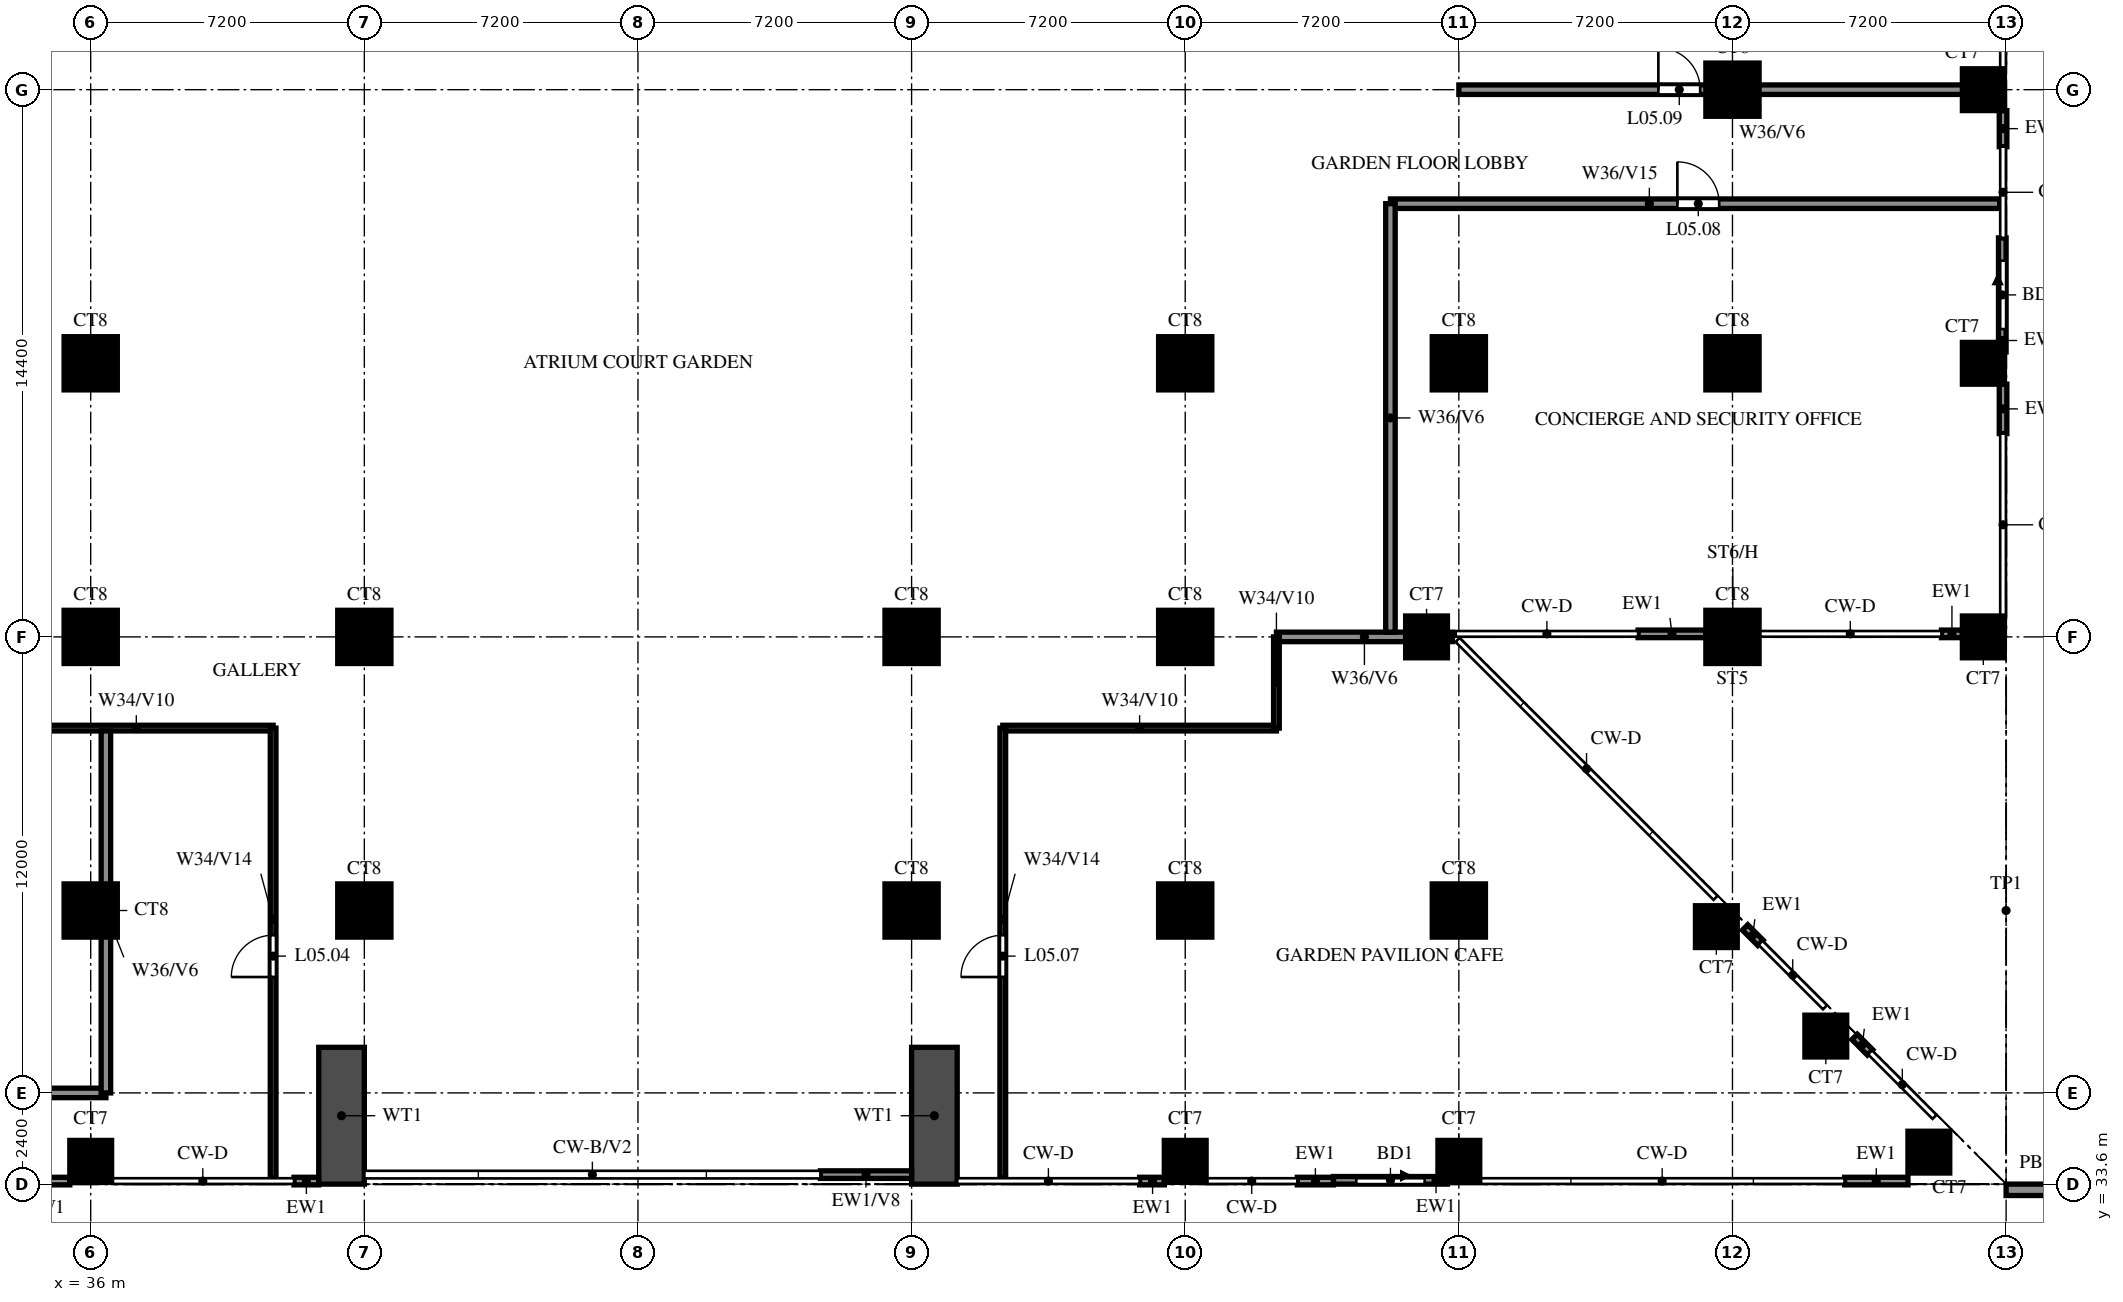
"""IFC4 building model, lengths in metres.
Left out: names, types, materials, properties, quantities, classifications, styles, units other than length and angle.
Written with IfcOpenShell. Run it as: python <this file> out.ifc"""

import sys

from ifc_helpers import new_model, si_unit, direction, frame, frame_2d, origin, origin_2d, place, context, subcontext, project, spatial, rectangle, extrude, source, transform, mapped, element, fill, save


model = new_model("IFC4")
c1 = context("Model", 3, precision=1e-05, world=origin(), true_north=direction((0.0, 1.0)))
c2 = subcontext(c1, "Body", "Model", "MODEL_VIEW")
j1 = project(units=[si_unit("LENGTHUNIT", "METRE"), si_unit("PLANEANGLEUNIT", "RADIAN")], contexts=[c1])
p1 = place(None, origin())
s1 = spatial("IfcSite", under=j1, at=p1, CompositionType="ELEMENT")
p2 = place(p1, origin())
s2 = spatial("IfcBuilding", under=s1, at=p2, CompositionType="ELEMENT")
p3 = place(p2, frame((0.0, 0.0, 27.0)))
s3 = spatial("IfcBuildingStorey", under=s2, at=p3, CompositionType="ELEMENT", Elevation=27.0)
m1 = source(origin(), c2, "Body", "SweptSolid", [
    extrude(rectangle(XDim=1.1, YDim=1.1, at=origin_2d()), origin(), (0.0, 0.0, 1.0), 3.18),
])
for number, where, z_axis, x_axis in (
    (1, (36.0, 34.2, 0.0), (0.0, 0.0, 1.0), (1.0, 0.0, 0.0)),
    (2, (64.8, 34.2, 0.0), (0.0, 0.0, 1.0), (1.0, 0.0, 0.0)),
    (3, (72.0, 34.2, 0.0), (0.0, 0.0, 1.0), (1.0, 0.0, 0.0)),
    (4, (84.367, 34.442, 0.0), (0.0, 0.0, 1.0), (1.0, 0.0, 0.0)),
    (5, (81.656, 37.496, 0.0), (0.0, 0.0, 1.0), (1.0, 0.0, 0.0)),
    (6, (78.776, 40.376, 0.0), (0.0, 0.0, 1.0), (1.0, 0.0, 0.0)),
):
    element("IfcColumn", number, at=place(p3, frame(where, z_axis=z_axis, x_axis=x_axis)), inside=s3, PredefinedType="COLUMN", context=c2, shape_type="MappedRepresentation", body=[
        mapped(m1, transform((0.0, 0.0, 0.0))),
    ])
m2 = source(origin(), c2, "Body", "SweptSolid", [
    extrude(rectangle(XDim=1.4, YDim=1.4, at=origin_2d()), origin(), (0.0, 0.0, 1.0), 3.18),
])
for number, where, z_axis, x_axis in (
    (7, (36.0, 40.8, 0.0), (0.0, 0.0, 1.0), (1.0, 0.0, 0.0)),
    (8, (43.2, 40.8, 0.0), (0.0, 0.0, 1.0), (1.0, 0.0, 0.0)),
    (9, (57.6, 40.8, 0.0), (0.0, 0.0, 1.0), (1.0, 0.0, 0.0)),
    (10, (64.8, 40.8, 0.0), (0.0, 0.0, 1.0), (1.0, 0.0, 0.0)),
    (11, (72.0, 40.8, 0.0), (0.0, 0.0, 1.0), (1.0, 0.0, 0.0)),
    (12, (36.0, 48.0, 0.0), (0.0, 0.0, 1.0), (1.0, 0.0, 0.0)),
    (13, (43.2, 48.0, 0.0), (0.0, 0.0, 1.0), (1.0, 0.0, 0.0)),
    (14, (57.6, 48.0, 0.0), (0.0, 0.0, 1.0), (1.0, 0.0, 0.0)),
    (15, (64.8, 48.0, 0.0), (0.0, 0.0, 1.0), (1.0, 0.0, 0.0)),
):
    element("IfcColumn", number, at=place(p3, frame(where, z_axis=z_axis, x_axis=x_axis)), inside=s3, PredefinedType="COLUMN", context=c2, shape_type="MappedRepresentation", body=[
        mapped(m2, transform((0.0, 0.0, 0.0))),
    ])
p4 = place(p3, frame((71.15, 48.0, 0.0), z_axis=(0.0, 0.0, 1.0), x_axis=(1.0, 0.0, 0.0)))
e16 = element("IfcColumn", 16, at=p4, inside=s3, PredefinedType="COLUMN", context=c2, shape_type="MappedRepresentation", body=[
    mapped(m1, transform((0.0, 0.0, 0.0))),
])
p5 = place(p3, frame((79.2, 48.0, 0.0), z_axis=(0.0, 0.0, 1.0), x_axis=(1.0, 0.0, 0.0)))
e17 = element("IfcColumn", 17, at=p5, inside=s3, PredefinedType="COLUMN", context=c2, shape_type="MappedRepresentation", body=[
    mapped(m2, transform((0.0, 0.0, 0.0))),
])
p6 = place(p3, frame((85.8, 48.0, 0.0), z_axis=(0.0, 0.0, 1.0), x_axis=(1.0, 0.0, 0.0)))
e18 = element("IfcColumn", 18, at=p6, inside=s3, PredefinedType="COLUMN", context=c2, shape_type="MappedRepresentation", body=[
    mapped(m1, transform((0.0, 0.0, 0.0))),
])
for number, where, z_axis, x_axis in (
    (19, (36.0, 55.2, 0.0), (0.0, 0.0, 1.0), (1.0, 0.0, 0.0)),
    (20, (64.8, 55.2, 0.0), (0.0, 0.0, 1.0), (1.0, 0.0, 0.0)),
    (21, (72.0, 55.2, 0.0), (0.0, 0.0, 1.0), (1.0, 0.0, 0.0)),
    (22, (79.2, 55.2, 0.0), (0.0, 0.0, 1.0), (1.0, 0.0, 0.0)),
):
    element("IfcColumn", number, at=place(p3, frame(where, z_axis=z_axis, x_axis=x_axis)), inside=s3, PredefinedType="COLUMN", context=c2, shape_type="MappedRepresentation", body=[
        mapped(m2, transform((0.0, 0.0, 0.0))),
    ])
p7 = place(p3, frame((85.8, 55.2, 0.0), z_axis=(0.0, 0.0, 1.0), x_axis=(1.0, 0.0, 0.0)))
e23 = element("IfcColumn", 23, at=p7, inside=s3, PredefinedType="COLUMN", context=c2, shape_type="MappedRepresentation", body=[
    mapped(m1, transform((0.0, 0.0, 0.0))),
])
p8 = place(p3, frame((79.2, 62.4, 0.0), z_axis=(0.0, 0.0, 1.0), x_axis=(1.0, 0.0, 0.0)))
e24 = element("IfcColumn", 24, at=p8, inside=s3, PredefinedType="COLUMN", context=c2, shape_type="MappedRepresentation", body=[
    mapped(m2, transform((0.0, 0.0, 0.0))),
])
p9 = place(p3, frame((85.8, 62.4, 0.0), z_axis=(0.0, 0.0, 1.0), x_axis=(1.0, 0.0, 0.0)))
e25 = element("IfcColumn", 25, at=p9, inside=s3, PredefinedType="COLUMN", context=c2, shape_type="MappedRepresentation", body=[
    mapped(m1, transform((0.0, 0.0, 0.0))),
])
for number, where, z_axis, x_axis in (
    (26, (42.6, 33.6, 0.0), (0.0, 0.0, 1.0), (0.0, 1.0, 0.0)),
    (27, (58.2, 33.6, 0.0), (0.0, 0.0, 1.0), (0.0, 1.0, 0.0)),
):
    element("IfcWall", number, at=place(p3, frame(where, z_axis=z_axis, x_axis=x_axis)), inside=s3, PredefinedType="SHEAR", context=c2, shape_type="SweptSolid", body=[
        extrude(rectangle(XDim=3.6, YDim=1.2, at=frame_2d((1.8, 0.0))), origin(), (0.0, 0.0, 1.0), 3.18),
    ])
p10 = place(p3, frame((82.82, 37.067, 0.0), z_axis=(0.0, 0.0, 1.0), x_axis=(-0.707106781187, 0.707106781187, 0.0)))
e28 = element("IfcWall", 28, at=p10, inside=s3, PredefinedType="SOLIDWALL", context=c2, shape_type="SweptSolid", body=[
    extrude(rectangle(XDim=0.577, YDim=0.2, at=frame_2d((0.289, 0.0))), origin(), (0.0, 0.0, 1.0), 3.18),
])
p11 = place(p3, frame((79.938, 39.949, 0.0), z_axis=(0.0, 0.0, 1.0), x_axis=(-0.707106781187, 0.707106781187, 0.0)))
e29 = element("IfcWall", 29, at=p11, inside=s3, PredefinedType="SOLIDWALL", context=c2, shape_type="SweptSolid", body=[
    extrude(rectangle(XDim=0.573, YDim=0.2, at=frame_2d((0.286, 0.0))), origin(), (0.0, 0.0, 1.0), 3.18),
])
p12 = place(p3, frame((76.717, 48.08, 0.0), z_axis=(0.0, 0.0, 1.0), x_axis=(1.0, 0.0, 0.0)))
e30 = element("IfcWall", 30, at=p12, inside=s3, PredefinedType="SOLIDWALL", context=c2, shape_type="SweptSolid", body=[
    extrude(rectangle(XDim=1.783, YDim=0.2, at=frame_2d((0.892, 0.0))), origin(), (0.0, 0.0, 1.0), 3.18),
])
p13 = place(p3, frame((84.7, 48.08, 0.0), z_axis=(0.0, 0.0, 1.0), x_axis=(1.0, 0.0, 0.0)))
e31 = element("IfcWall", 31, at=p13, inside=s3, PredefinedType="SOLIDWALL", context=c2, shape_type="SweptSolid", body=[
    extrude(rectangle(XDim=0.55, YDim=0.2, at=frame_2d((0.275, 0.0))), origin(), (0.0, 0.0, 1.0), 3.18),
])
p14 = place(p3, frame((86.3, 55.5, 0.0), z_axis=(0.0, 0.0, 1.0), x_axis=(0.0, 1.0, 0.0)))
e32 = element("IfcWall", 32, at=p14, inside=s3, PredefinedType="SOLIDWALL", context=c2, shape_type="SweptSolid", body=[
    extrude(rectangle(XDim=3.0, YDim=0.2, at=frame_2d((1.5, 0.0))), origin(), (0.0, 0.0, 1.0), 3.18),
])
p15 = place(p14, frame((0.6, 0.0, 0.0)))
e33 = element("IfcOpeningElement", 33, at=p15, cuts=e32, PredefinedType="OPENING", context=c2, shape_type="SweptSolid", body=[
    extrude(rectangle(XDim=1.8, YDim=2.4, at=frame_2d((0.9, 1.2))), frame((0.0, 0.11, 0.0), z_axis=(0.0, -1.0, 0.0), x_axis=(1.0, 0.0, 0.0)), (0.0, 0.0, 1.0), 0.22),
])
p16 = place(p3, frame((86.32, 53.35, 0.0), z_axis=(0.0, 0.0, 1.0), x_axis=(0.0, 1.0, 0.0)))
e34 = element("IfcWall", 34, at=p16, inside=s3, PredefinedType="SOLIDWALL", context=c2, shape_type="SweptSolid", body=[
    extrude(rectangle(XDim=1.3, YDim=0.2, at=frame_2d((0.65, 0.0))), origin(), (0.0, 0.0, 1.0), 3.18),
])
p17 = place(p3, frame((86.32, 60.9, 0.0), z_axis=(0.0, 0.0, 1.0), x_axis=(0.0, 1.0, 0.0)))
e35 = element("IfcWall", 35, at=p17, inside=s3, PredefinedType="SOLIDWALL", context=c2, shape_type="SweptSolid", body=[
    extrude(rectangle(XDim=0.95, YDim=0.2, at=frame_2d((0.475, 0.0))), origin(), (0.0, 0.0, 1.0), 3.18),
])
p18 = place(p3, frame((68.7, 33.7, 0.0), z_axis=(0.0, 0.0, 1.0), x_axis=(1.0, 0.0, 0.0)))
e36 = element("IfcWall", 36, at=p18, inside=s3, PredefinedType="SOLIDWALL", context=c2, shape_type="SweptSolid", body=[
    extrude(rectangle(XDim=3.0, YDim=0.2, at=frame_2d((1.5, 0.0))), origin(), (0.0, 0.0, 1.0), 3.18),
])
p19 = place(p18, frame((0.6, 0.0, 0.0)))
e37 = element("IfcOpeningElement", 37, at=p19, cuts=e36, PredefinedType="OPENING", context=c2, shape_type="SweptSolid", body=[
    extrude(rectangle(XDim=1.8, YDim=2.4, at=frame_2d((0.9, 1.2))), frame((0.0, 0.11, 0.0), z_axis=(0.0, -1.0, 0.0), x_axis=(1.0, 0.0, 0.0)), (0.0, 0.0, 1.0), 0.22),
])
p20 = place(p3, frame((34.15, 33.68, 0.0), z_axis=(0.0, 0.0, 1.0), x_axis=(1.0, 0.0, 0.0)))
e38 = element("IfcWall", 38, at=p20, inside=s3, PredefinedType="SOLIDWALL", context=c2, shape_type="SweptSolid", body=[
    extrude(rectangle(XDim=1.3, YDim=0.2, at=frame_2d((0.65, 0.0))), origin(), (0.0, 0.0, 1.0), 3.18),
])
for number, where, z_axis, x_axis in (
    (39, (41.35, 33.68, 0.0), (0.0, 0.0, 1.0), (1.0, 0.0, 0.0)),
    (40, (63.6, 33.68, 0.0), (0.0, 0.0, 1.0), (1.0, 0.0, 0.0)),
):
    element("IfcWall", number, at=place(p3, frame(where, z_axis=z_axis, x_axis=x_axis)), inside=s3, PredefinedType="SOLIDWALL", context=c2, shape_type="SweptSolid", body=[
        extrude(rectangle(XDim=0.65, YDim=0.2, at=frame_2d((0.325, 0.0))), origin(), (0.0, 0.0, 1.0), 3.18),
    ])
p21 = place(p3, frame((67.75, 33.68, 0.0), z_axis=(0.0, 0.0, 1.0), x_axis=(1.0, 0.0, 0.0)))
e41 = element("IfcWall", 41, at=p21, inside=s3, PredefinedType="SOLIDWALL", context=c2, shape_type="SweptSolid", body=[
    extrude(rectangle(XDim=0.95, YDim=0.2, at=frame_2d((0.475, 0.0))), origin(), (0.0, 0.0, 1.0), 3.18),
])
p22 = place(p3, frame((82.15, 33.68, 0.0), z_axis=(0.0, 0.0, 1.0), x_axis=(1.0, 0.0, 0.0)))
e42 = element("IfcWall", 42, at=p22, inside=s3, PredefinedType="SOLIDWALL", context=c2, shape_type="SweptSolid", body=[
    extrude(rectangle(XDim=1.667, YDim=0.2, at=frame_2d((0.834, 0.0))), origin(), (0.0, 0.0, 1.0), 3.18),
])
p23 = place(p3, frame((55.2, 33.85, 0.0), z_axis=(0.0, 0.0, 1.0), x_axis=(1.0, 0.0, 0.0)))
e43 = element("IfcWall", 43, at=p23, inside=s3, PredefinedType="SOLIDWALL", context=c2, shape_type="SweptSolid", body=[
    extrude(rectangle(XDim=2.4, YDim=0.2, at=frame_2d((1.2, 0.0))), origin(), (0.0, 0.0, 1.0), 1.98),
])
p24 = place(p3, frame((86.4, 33.45, -0.45), z_axis=(0.0, 0.0, 1.0), x_axis=(1.0, 0.0, 0.0)))
e44 = element("IfcWall", 44, at=p24, inside=s3, PredefinedType="SOLIDWALL", context=c2, shape_type="SweptSolid", body=[
    extrude(rectangle(XDim=2.4, YDim=0.3, at=frame_2d((1.2, 0.0))), origin(), (0.0, 0.0, 1.0), 3.63),
])
p25 = place(p3, frame((22.0, 36.0, 0.0), z_axis=(0.0, 0.0, 1.0), x_axis=(1.0, 0.0, 0.0)))
e45 = element("IfcWall", 45, at=p25, inside=s3, PredefinedType="SOLIDWALL", context=c2, shape_type="SweptSolid", body=[
    extrude(rectangle(XDim=14.4, YDim=0.25, at=frame_2d((7.2, 0.0))), origin(), (0.0, 0.0, 1.0), 3.18),
])
for number, where, z_axis, x_axis in (
    (46, (33.6, 45.6, 0.0), (0.0, 0.0, 1.0), (1.0, 0.0, 0.0)),
    (47, (60.0, 45.6, 0.0), (0.0, 0.0, 1.0), (1.0, 0.0, 0.0)),
):
    element("IfcWall", number, at=place(p3, frame(where, z_axis=z_axis, x_axis=x_axis)), inside=s3, PredefinedType="PARTITIONING", context=c2, shape_type="SweptSolid", body=[
        extrude(rectangle(XDim=7.2, YDim=0.15, at=frame_2d((3.6, 0.0))), origin(), (0.0, 0.0, 1.0), 3.18),
    ])
p26 = place(p3, frame((67.2, 48.0, 0.0), z_axis=(0.0, 0.0, 1.0), x_axis=(1.0, 0.0, 0.0)))
e48 = element("IfcWall", 48, at=p26, inside=s3, PredefinedType="SOLIDWALL", context=c2, shape_type="SweptSolid", body=[
    extrude(rectangle(XDim=4.63, YDim=0.25, at=frame_2d((2.315, 0.0))), origin(), (0.0, 0.0, 1.0), 3.18),
])
p27 = place(p3, frame((70.2, 59.4, 0.0), z_axis=(0.0, 0.0, 1.0), x_axis=(1.0, 0.0, 0.0)))
e49 = element("IfcWall", 49, at=p27, inside=s3, PredefinedType="SOLIDWALL", context=c2, shape_type="SweptSolid", body=[
    extrude(rectangle(XDim=16.03, YDim=0.25, at=frame_2d((8.015, 0.0))), origin(), (0.0, 0.0, 1.0), 2.28),
])
p28 = place(p27, frame((7.55, 0.0, 0.0)))
e50 = element("IfcOpeningElement", 50, at=p28, cuts=e49, PredefinedType="OPENING", context=c2, shape_type="SweptSolid", body=[
    extrude(rectangle(XDim=1.1, YDim=2.1, at=frame_2d((0.55, 1.05))), frame((0.0, 0.135, 0.0), z_axis=(0.0, -1.0, 0.0), x_axis=(1.0, 0.0, 0.0)), (0.0, 0.0, 1.0), 0.27),
])
p29 = place(p3, frame((72.0, 62.4, 0.0), z_axis=(0.0, 0.0, 1.0), x_axis=(1.0, 0.0, 0.0)))
e51 = element("IfcWall", 51, at=p29, inside=s3, PredefinedType="SOLIDWALL", context=c2, shape_type="SweptSolid", body=[
    extrude(rectangle(XDim=14.23, YDim=0.25, at=frame_2d((7.115, 0.0))), origin(), (0.0, 0.0, 1.0), 3.18),
])
p30 = place(p29, frame((5.25, 0.0, 0.0)))
e52 = element("IfcOpeningElement", 52, at=p30, cuts=e51, PredefinedType="OPENING", context=c2, shape_type="SweptSolid", body=[
    extrude(rectangle(XDim=1.1, YDim=2.1, at=frame_2d((0.55, 1.05))), frame((0.0, 0.135, 0.0), z_axis=(0.0, -1.0, 0.0), x_axis=(1.0, 0.0, 0.0)), (0.0, 0.0, 1.0), 0.27),
])
p31 = place(p3, frame((36.4, 36.0, 0.0), z_axis=(0.0, 0.0, 1.0), x_axis=(0.0, 1.0, 0.0)))
e53 = element("IfcWall", 53, at=p31, inside=s3, PredefinedType="SOLIDWALL", context=c2, shape_type="SweptSolid", body=[
    extrude(rectangle(XDim=9.525, YDim=0.25, at=frame_2d((4.762, 0.0))), origin(), (0.0, 0.0, 1.0), 3.18),
])
p32 = place(p3, frame((40.8, 33.77, 0.0), z_axis=(0.0, 0.0, 1.0), x_axis=(0.0, 1.0, 0.0)))
e54 = element("IfcWall", 54, at=p32, inside=s3, PredefinedType="PARTITIONING", context=c2, shape_type="SweptSolid", body=[
    extrude(rectangle(XDim=11.83, YDim=0.15, at=frame_2d((5.915, 0.0))), origin(), (0.0, 0.0, 1.0), 2.28),
])
p33 = place(p32, frame((5.28, 0.0, 0.0)))
e55 = element("IfcOpeningElement", 55, at=p33, cuts=e54, PredefinedType="OPENING", context=c2, shape_type="SweptSolid", body=[
    extrude(rectangle(XDim=1.1, YDim=2.1, at=frame_2d((0.55, 1.05))), frame((0.0, 0.085, 0.0), z_axis=(0.0, -1.0, 0.0), x_axis=(1.0, 0.0, 0.0)), (0.0, 0.0, 1.0), 0.17),
])
p34 = place(p3, frame((60.0, 33.77, 0.0), z_axis=(0.0, 0.0, 1.0), x_axis=(0.0, 1.0, 0.0)))
e56 = element("IfcWall", 56, at=p34, inside=s3, PredefinedType="PARTITIONING", context=c2, shape_type="SweptSolid", body=[
    extrude(rectangle(XDim=11.83, YDim=0.15, at=frame_2d((5.915, 0.0))), origin(), (0.0, 0.0, 1.0), 2.28),
])
p35 = place(p34, frame((5.28, 0.0, 0.0)))
e57 = element("IfcOpeningElement", 57, at=p35, cuts=e56, PredefinedType="OPENING", context=c2, shape_type="SweptSolid", body=[
    extrude(rectangle(XDim=1.1, YDim=2.1, at=frame_2d((0.55, 1.05))), frame((0.0, 0.085, 0.0), z_axis=(0.0, -1.0, 0.0), x_axis=(1.0, 0.0, 0.0)), (0.0, 0.0, 1.0), 0.17),
])
p36 = place(p3, frame((67.2, 45.6, 0.0), z_axis=(0.0, 0.0, 1.0), x_axis=(0.0, 1.0, 0.0)))
e58 = element("IfcWall", 58, at=p36, inside=s3, PredefinedType="PARTITIONING", context=c2, shape_type="SweptSolid", body=[
    extrude(rectangle(XDim=2.4, YDim=0.15, at=frame_2d((1.2, 0.0))), origin(), (0.0, 0.0, 1.0), 3.18),
])
p37 = place(p3, frame((70.2, 48.125, 0.0), z_axis=(0.0, 0.0, 1.0), x_axis=(0.0, 1.0, 0.0)))
e59 = element("IfcWall", 59, at=p37, inside=s3, PredefinedType="SOLIDWALL", context=c2, shape_type="SweptSolid", body=[
    extrude(rectangle(XDim=11.275, YDim=0.25, at=frame_2d((5.637, 0.0))), origin(), (0.0, 0.0, 1.0), 3.18),
])
p38 = place(p15, origin())
e60 = element("IfcDoor", 60, at=p38, inside=s3, OperationType="DOUBLE_DOOR_SLIDING", PredefinedType="DOOR", context=c2, shape_type="SweptSolid", body=[
    extrude(rectangle(XDim=1.8, YDim=2.4, at=frame_2d((0.9, 1.2))), frame((0.0, 0.025, 0.0), z_axis=(0.0, -1.0, 0.0), x_axis=(1.0, 0.0, 0.0)), (0.0, 0.0, 1.0), 0.05),
])
fill(e33, e60)
p39 = place(p19, origin())
e61 = element("IfcDoor", 61, at=p39, inside=s3, OperationType="DOUBLE_DOOR_SLIDING", PredefinedType="DOOR", context=c2, shape_type="SweptSolid", body=[
    extrude(rectangle(XDim=1.8, YDim=2.4, at=frame_2d((0.9, 1.2))), frame((0.0, 0.025, 0.0), z_axis=(0.0, -1.0, 0.0), x_axis=(1.0, 0.0, 0.0)), (0.0, 0.0, 1.0), 0.05),
])
fill(e37, e61)
p40 = place(p33, origin())
e62 = element("IfcDoor", 62, at=p40, inside=s3, OperationType="SINGLE_SWING_LEFT", PredefinedType="DOOR", context=c2, shape_type="SweptSolid", body=[
    extrude(rectangle(XDim=1.1, YDim=2.1, at=frame_2d((0.55, 1.05))), frame((0.0, 0.025, 0.0), z_axis=(0.0, -1.0, 0.0), x_axis=(1.0, 0.0, 0.0)), (0.0, 0.0, 1.0), 0.05),
])
fill(e55, e62)
p41 = place(p35, origin())
e63 = element("IfcDoor", 63, at=p41, inside=s3, OperationType="SINGLE_SWING_LEFT", PredefinedType="DOOR", context=c2, shape_type="SweptSolid", body=[
    extrude(rectangle(XDim=1.1, YDim=2.1, at=frame_2d((0.55, 1.05))), frame((0.0, 0.025, 0.0), z_axis=(0.0, -1.0, 0.0), x_axis=(1.0, 0.0, 0.0)), (0.0, 0.0, 1.0), 0.05),
])
fill(e57, e63)
p42 = place(p28, origin())
e64 = element("IfcDoor", 64, at=p42, inside=s3, OperationType="SINGLE_SWING_RIGHT", PredefinedType="DOOR", context=c2, shape_type="SweptSolid", body=[
    extrude(rectangle(XDim=1.1, YDim=2.1, at=frame_2d((0.55, 1.05))), frame((0.0, 0.025, 0.0), z_axis=(0.0, -1.0, 0.0), x_axis=(1.0, 0.0, 0.0)), (0.0, 0.0, 1.0), 0.05),
])
fill(e50, e64)
p43 = place(p30, origin())
e65 = element("IfcDoor", 65, at=p43, inside=s3, OperationType="SINGLE_SWING_LEFT", PredefinedType="DOOR", context=c2, shape_type="SweptSolid", body=[
    extrude(rectangle(XDim=1.1, YDim=2.1, at=frame_2d((0.55, 1.05))), frame((0.0, 0.025, 0.0), z_axis=(0.0, -1.0, 0.0), x_axis=(1.0, 0.0, 0.0)), (0.0, 0.0, 1.0), 0.05),
])
fill(e52, e65)
save(model, sys.argv[1])
